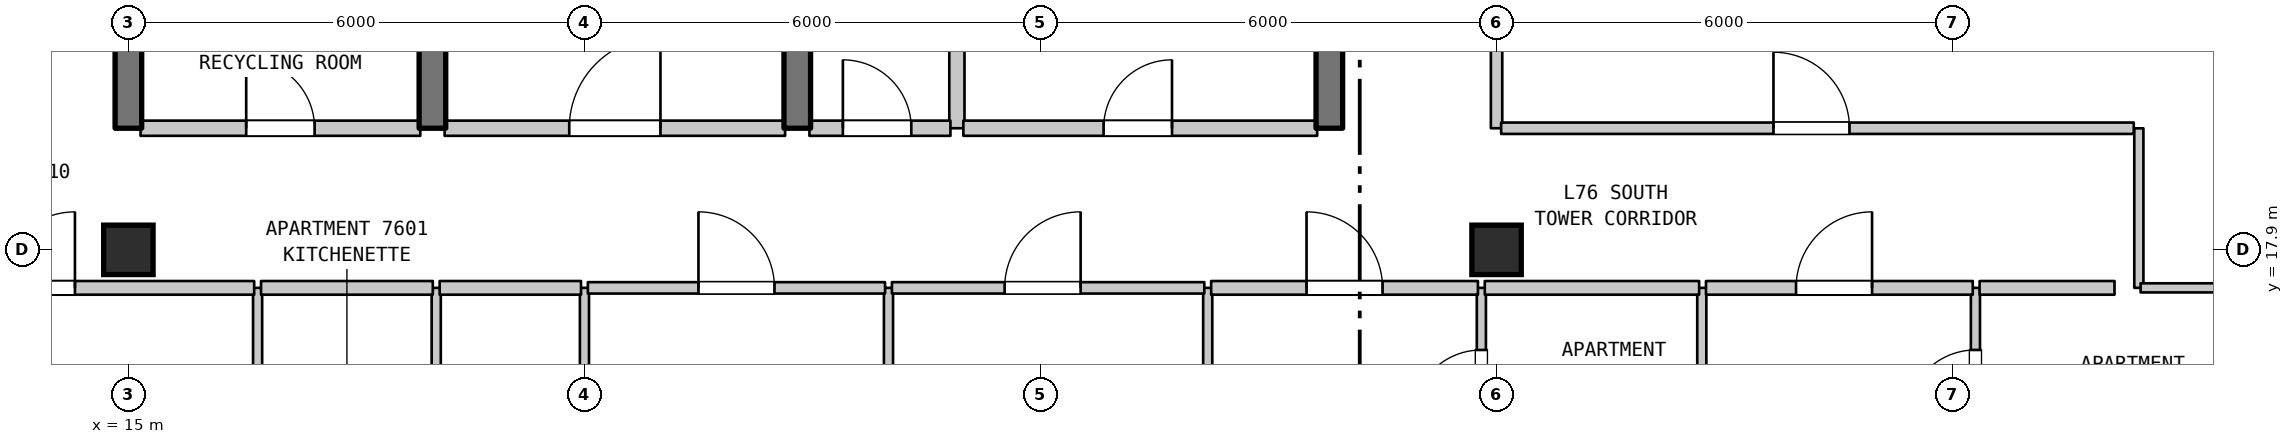
"""IFC4 building model, lengths in metres.
Left out: names, types, materials, properties, quantities, classifications, styles, units other than length and angle.
Written with IfcOpenShell. Run it as: python <this file> out.ifc"""

import sys

from ifc_helpers import new_model, si_unit, direction, frame, frame_2d, origin, origin_2d, place, context, subcontext, project, spatial, rectangle, extrude, element, fill, save


model = new_model("IFC4")
c1 = context("Model", 3, precision=1e-05, world=origin(), true_north=direction((0.0, 1.0)))
c2 = subcontext(c1, "Body", "Model", "MODEL_VIEW")
j1 = project(units=[si_unit("LENGTHUNIT", "METRE"), si_unit("PLANEANGLEUNIT", "RADIAN")], contexts=[c1])
p1 = place(None, origin())
s1 = spatial("IfcSite", under=j1, at=p1, CompositionType="ELEMENT")
p2 = place(p1, origin())
s2 = spatial("IfcBuilding", under=s1, at=p2, CompositionType="ELEMENT")
p3 = place(p2, frame((0.0, 0.0, 303.6)))
s3 = spatial("IfcBuildingStorey", under=s2, at=p3, CompositionType="ELEMENT", Elevation=303.6)
for number, where, z_axis, x_axis in (
    (1, (15.0, 17.9, 0.0), (0.0, 0.0, 1.0), (1.0, 0.0, 0.0)),
    (2, (33.0, 17.9, 0.0), (0.0, 0.0, 1.0), (1.0, 0.0, 0.0)),
):
    element("IfcColumn", number, at=place(p3, frame(where, z_axis=z_axis, x_axis=x_axis)), inside=s3, PredefinedType="COLUMN", context=c2, shape_type="SweptSolid", body=[
        extrude(rectangle(XDim=0.65, YDim=0.65, at=origin_2d()), origin(), (0.0, 0.0, 1.0), 3.7),
    ])
p4 = place(p3, frame((15.0, 19.5, 0.0), z_axis=(0.0, 0.0, 1.0), x_axis=(0.0, 1.0, 0.0)))
e3 = element("IfcWall", 3, at=p4, inside=s3, PredefinedType="SHEAR", context=c2, shape_type="SweptSolid", body=[
    extrude(rectangle(XDim=3.2, YDim=0.35, at=frame_2d((1.6, 0.0))), origin(), (0.0, 0.0, 1.0), 3.39),
])
p5 = place(p3, frame((16.7, 14.2, 0.0), z_axis=(0.0, 0.0, 1.0), x_axis=(0.0, 1.0, 0.0)))
e4 = element("IfcWall", 4, at=p5, inside=s3, PredefinedType="PARTITIONING", context=c2, shape_type="SweptSolid", body=[
    extrude(rectangle(XDim=3.2, YDim=0.12, at=frame_2d((1.6, 0.0))), origin(), (0.0, 0.0, 1.0), 3.39),
])
p6 = place(p5, frame((1.15, 0.0, 0.0)))
e5 = element("IfcOpeningElement", 5, at=p6, cuts=e4, PredefinedType="OPENING", context=c2, shape_type="SweptSolid", body=[
    extrude(rectangle(XDim=0.9, YDim=2.15, at=frame_2d((0.45, 1.075))), frame((0.0, 0.07, 0.0), z_axis=(0.0, -1.0, 0.0), x_axis=(1.0, 0.0, 0.0)), (0.0, 0.0, 1.0), 0.14),
])
p7 = place(p3, frame((19.0, 19.5, 0.0), z_axis=(0.0, 0.0, 1.0), x_axis=(0.0, 1.0, 0.0)))
e6 = element("IfcWall", 6, at=p7, inside=s3, PredefinedType="SHEAR", context=c2, shape_type="SweptSolid", body=[
    extrude(rectangle(XDim=3.2, YDim=0.35, at=frame_2d((1.6, 0.0))), origin(), (0.0, 0.0, 1.0), 3.39),
])
p8 = place(p3, frame((19.05, 14.2, 0.0), z_axis=(0.0, 0.0, 1.0), x_axis=(0.0, 1.0, 0.0)))
e7 = element("IfcWall", 7, at=p8, inside=s3, PredefinedType="PARTITIONING", context=c2, shape_type="SweptSolid", body=[
    extrude(rectangle(XDim=3.2, YDim=0.12, at=frame_2d((1.6, 0.0))), origin(), (0.0, 0.0, 1.0), 3.39),
])
p9 = place(p3, frame((21.0, 10.6, 0.0), z_axis=(0.0, 0.0, 1.0), x_axis=(0.0, 1.0, 0.0)))
e8 = element("IfcWall", 8, at=p9, inside=s3, PredefinedType="PARTITIONING", context=c2, shape_type="SweptSolid", body=[
    extrude(rectangle(XDim=6.8, YDim=0.12, at=frame_2d((3.4, 0.0))), origin(), (0.0, 0.0, 1.0), 3.39),
])
p10 = place(p3, frame((23.8, 19.5, 0.0), z_axis=(0.0, 0.0, 1.0), x_axis=(0.0, 1.0, 0.0)))
e9 = element("IfcWall", 9, at=p10, inside=s3, PredefinedType="SHEAR", context=c2, shape_type="SweptSolid", body=[
    extrude(rectangle(XDim=6.6, YDim=0.35, at=frame_2d((3.3, 0.0))), origin(), (0.0, 0.0, 1.0), 3.39),
])
p11 = place(p10, frame((4.304, 0.0, 0.0)))
e10 = element("IfcOpeningElement", 10, at=p11, cuts=e9, PredefinedType="OPENING", context=c2, shape_type="SweptSolid", body=[
    extrude(rectangle(XDim=0.9, YDim=2.15, at=frame_2d((0.45, 1.075))), frame((0.0, 0.185, 0.0), z_axis=(0.0, -1.0, 0.0), x_axis=(1.0, 0.0, 0.0)), (0.0, 0.0, 1.0), 0.37),
])
p12 = place(p3, frame((25.0, 10.6, 0.0), z_axis=(0.0, 0.0, 1.0), x_axis=(0.0, 1.0, 0.0)))
e11 = element("IfcWall", 11, at=p12, inside=s3, PredefinedType="PARTITIONING", context=c2, shape_type="SweptSolid", body=[
    extrude(rectangle(XDim=6.8, YDim=0.12, at=frame_2d((3.4, 0.0))), origin(), (0.0, 0.0, 1.0), 3.39),
])
p13 = place(p3, frame((25.9, 19.5, 0.0), z_axis=(0.0, 0.0, 1.0), x_axis=(0.0, 1.0, 0.0)))
e12 = element("IfcWall", 12, at=p13, inside=s3, PredefinedType="STANDARD", context=c2, shape_type="SweptSolid", body=[
    extrude(rectangle(XDim=3.2, YDim=0.2, at=frame_2d((1.6, 0.0))), origin(), (0.0, 0.0, 1.0), 3.39),
])
p14 = place(p3, frame((29.2, 6.71, 0.0), z_axis=(0.0, 0.0, 1.0), x_axis=(0.0, 1.0, 0.0)))
e13 = element("IfcWall", 13, at=p14, inside=s3, PredefinedType="PARTITIONING", context=c2, shape_type="SweptSolid", body=[
    extrude(rectangle(XDim=10.69, YDim=0.12, at=frame_2d((5.345, 0.0))), origin(), (0.0, 0.0, 1.0), 3.39),
])
p15 = place(p3, frame((30.8, 19.5, 0.0), z_axis=(0.0, 0.0, 1.0), x_axis=(0.0, 1.0, 0.0)))
e14 = element("IfcWall", 14, at=p15, inside=s3, PredefinedType="SHEAR", context=c2, shape_type="SweptSolid", body=[
    extrude(rectangle(XDim=3.2, YDim=0.35, at=frame_2d((1.6, 0.0))), origin(), (0.0, 0.0, 1.0), 3.39),
])
p16 = place(p3, frame((32.8, 15.008, 0.0), z_axis=(0.0, 0.0, 1.0), x_axis=(0.0, 1.0, 0.0)))
e15 = element("IfcWall", 15, at=p16, inside=s3, PredefinedType="PARTITIONING", context=c2, shape_type="SweptSolid", body=[
    extrude(rectangle(XDim=2.392, YDim=0.12, at=frame_2d((1.196, 0.0))), origin(), (0.0, 0.0, 1.0), 3.39),
])
p17 = place(p16, frame((0.675, 0.0, 0.0)))
e16 = element("IfcOpeningElement", 16, at=p17, cuts=e15, PredefinedType="OPENING", context=c2, shape_type="SweptSolid", body=[
    extrude(rectangle(XDim=0.9, YDim=2.1, at=frame_2d((0.45, 1.05))), frame((0.0, 0.07, 0.0), z_axis=(0.0, -1.0, 0.0), x_axis=(1.0, 0.0, 0.0)), (0.0, 0.0, 1.0), 0.14),
])
p18 = place(p3, frame((33.0, 19.5, 0.0), z_axis=(0.0, 0.0, 1.0), x_axis=(0.0, 1.0, 0.0)))
e17 = element("IfcWall", 17, at=p18, inside=s3, PredefinedType="STANDARD", context=c2, shape_type="SweptSolid", body=[
    extrude(rectangle(XDim=8.4, YDim=0.15, at=frame_2d((4.2, 0.0))), origin(), (0.0, 0.0, 1.0), 3.1),
])
p19 = place(p18, frame((4.079, 0.0, 0.0)))
e18 = element("IfcOpeningElement", 18, at=p19, cuts=e17, PredefinedType="OPENING", context=c2, shape_type="SweptSolid", body=[
    extrude(rectangle(XDim=1.0, YDim=2.15, at=frame_2d((0.5, 1.075))), frame((0.0, 0.085, 0.0), z_axis=(0.0, -1.0, 0.0), x_axis=(1.0, 0.0, 0.0)), (0.0, 0.0, 1.0), 0.17),
])
p20 = place(p3, frame((35.7, 15.008, 0.0), z_axis=(0.0, 0.0, 1.0), x_axis=(0.0, 1.0, 0.0)))
e19 = element("IfcWall", 19, at=p20, inside=s3, PredefinedType="PARTITIONING", context=c2, shape_type="SweptSolid", body=[
    extrude(rectangle(XDim=2.392, YDim=0.12, at=frame_2d((1.196, 0.0))), origin(), (0.0, 0.0, 1.0), 3.39),
])
p21 = place(p3, frame((39.3, 15.008, 0.0), z_axis=(0.0, 0.0, 1.0), x_axis=(0.0, 1.0, 0.0)))
e20 = element("IfcWall", 20, at=p21, inside=s3, PredefinedType="PARTITIONING", context=c2, shape_type="SweptSolid", body=[
    extrude(rectangle(XDim=2.392, YDim=0.12, at=frame_2d((1.196, 0.0))), origin(), (0.0, 0.0, 1.0), 3.39),
])
p22 = place(p21, frame((0.675, 0.0, 0.0)))
e21 = element("IfcOpeningElement", 21, at=p22, cuts=e20, PredefinedType="OPENING", context=c2, shape_type="SweptSolid", body=[
    extrude(rectangle(XDim=0.9, YDim=2.1, at=frame_2d((0.45, 1.05))), frame((0.0, 0.07, 0.0), z_axis=(0.0, -1.0, 0.0), x_axis=(1.0, 0.0, 0.0)), (0.0, 0.0, 1.0), 0.14),
])
p23 = place(p3, frame((41.45, 17.4, 0.0), z_axis=(0.0, 0.0, 1.0), x_axis=(0.0, 1.0, 0.0)))
e22 = element("IfcWall", 22, at=p23, inside=s3, PredefinedType="PARTITIONING", context=c2, shape_type="SweptSolid", body=[
    extrude(rectangle(XDim=2.099, YDim=0.12, at=frame_2d((1.05, 0.0))), origin(), (0.0, 0.0, 1.0), 3.39),
])
p24 = place(p3, frame((12.975, 17.4, 0.0), z_axis=(0.0, 0.0, 1.0), x_axis=(1.0, 0.0, 0.0)))
e23 = element("IfcWall", 23, at=p24, inside=s3, PredefinedType="STANDARD", context=c2, shape_type="SweptSolid", body=[
    extrude(rectangle(XDim=3.68, YDim=0.18, at=frame_2d((1.84, 0.0))), origin(), (0.0, 0.0, 1.0), 3.39),
])
p25 = place(p24, frame((0.322, 0.0, 0.0)))
e24 = element("IfcOpeningElement", 24, at=p25, cuts=e23, PredefinedType="OPENING", context=c2, shape_type="SweptSolid", body=[
    extrude(rectangle(XDim=1.0, YDim=2.15, at=frame_2d((0.5, 1.075))), frame((0.0, 0.1, 0.0), z_axis=(0.0, -1.0, 0.0), x_axis=(1.0, 0.0, 0.0)), (0.0, 0.0, 1.0), 0.2),
])
p26 = place(p3, frame((16.745, 17.4, 0.0), z_axis=(0.0, 0.0, 1.0), x_axis=(1.0, 0.0, 0.0)))
e25 = element("IfcWall", 25, at=p26, inside=s3, PredefinedType="STANDARD", context=c2, shape_type="SweptSolid", body=[
    extrude(rectangle(XDim=2.26, YDim=0.18, at=frame_2d((1.13, 0.0))), origin(), (0.0, 0.0, 1.0), 3.39),
])
p27 = place(p3, frame((19.095, 17.4, 0.0), z_axis=(0.0, 0.0, 1.0), x_axis=(1.0, 0.0, 0.0)))
e26 = element("IfcWall", 26, at=p27, inside=s3, PredefinedType="STANDARD", context=c2, shape_type="SweptSolid", body=[
    extrude(rectangle(XDim=1.86, YDim=0.18, at=frame_2d((0.93, 0.0))), origin(), (0.0, 0.0, 1.0), 3.39),
])
p28 = place(p3, frame((21.045, 17.4, 0.0), z_axis=(0.0, 0.0, 1.0), x_axis=(1.0, 0.0, 0.0)))
e27 = element("IfcWall", 27, at=p28, inside=s3, PredefinedType="STANDARD", context=c2, shape_type="SweptSolid", body=[
    extrude(rectangle(XDim=3.91, YDim=0.15, at=frame_2d((1.955, 0.0))), origin(), (0.0, 0.0, 1.0), 3.39),
])
p29 = place(p28, frame((1.455, 0.0, 0.0)))
e28 = element("IfcOpeningElement", 28, at=p29, cuts=e27, PredefinedType="OPENING", context=c2, shape_type="SweptSolid", body=[
    extrude(rectangle(XDim=1.0, YDim=2.15, at=frame_2d((0.5, 1.075))), frame((0.0, 0.085, 0.0), z_axis=(0.0, -1.0, 0.0), x_axis=(1.0, 0.0, 0.0)), (0.0, 0.0, 1.0), 0.17),
])
p30 = place(p3, frame((25.045, 17.4, 0.0), z_axis=(0.0, 0.0, 1.0), x_axis=(1.0, 0.0, 0.0)))
e29 = element("IfcWall", 29, at=p30, inside=s3, PredefinedType="STANDARD", context=c2, shape_type="SweptSolid", body=[
    extrude(rectangle(XDim=4.11, YDim=0.15, at=frame_2d((2.055, 0.0))), origin(), (0.0, 0.0, 1.0), 3.39),
])
p31 = place(p30, frame((1.483, 0.0, 0.0)))
e30 = element("IfcOpeningElement", 30, at=p31, cuts=e29, PredefinedType="OPENING", context=c2, shape_type="SweptSolid", body=[
    extrude(rectangle(XDim=1.0, YDim=2.15, at=frame_2d((0.5, 1.075))), frame((0.0, 0.085, 0.0), z_axis=(0.0, -1.0, 0.0), x_axis=(1.0, 0.0, 0.0)), (0.0, 0.0, 1.0), 0.17),
])
p32 = place(p3, frame((29.245, 17.4, 0.0), z_axis=(0.0, 0.0, 1.0), x_axis=(1.0, 0.0, 0.0)))
e31 = element("IfcWall", 31, at=p32, inside=s3, PredefinedType="STANDARD", context=c2, shape_type="SweptSolid", body=[
    extrude(rectangle(XDim=3.51, YDim=0.18, at=frame_2d((1.755, 0.0))), origin(), (0.0, 0.0, 1.0), 3.39),
])
p33 = place(p32, frame((1.255, 0.0, 0.0)))
e32 = element("IfcOpeningElement", 32, at=p33, cuts=e31, PredefinedType="OPENING", context=c2, shape_type="SweptSolid", body=[
    extrude(rectangle(XDim=1.0, YDim=2.15, at=frame_2d((0.5, 1.075))), frame((0.0, 0.1, 0.0), z_axis=(0.0, -1.0, 0.0), x_axis=(1.0, 0.0, 0.0)), (0.0, 0.0, 1.0), 0.2),
])
p34 = place(p3, frame((32.845, 17.4, 0.0), z_axis=(0.0, 0.0, 1.0), x_axis=(1.0, 0.0, 0.0)))
e33 = element("IfcWall", 33, at=p34, inside=s3, PredefinedType="STANDARD", context=c2, shape_type="SweptSolid", body=[
    extrude(rectangle(XDim=2.82, YDim=0.18, at=frame_2d((1.41, 0.0))), origin(), (0.0, 0.0, 1.0), 3.39),
])
p35 = place(p3, frame((35.755, 17.4, 0.0), z_axis=(0.0, 0.0, 1.0), x_axis=(1.0, 0.0, 0.0)))
e34 = element("IfcWall", 34, at=p35, inside=s3, PredefinedType="STANDARD", context=c2, shape_type="SweptSolid", body=[
    extrude(rectangle(XDim=3.51, YDim=0.18, at=frame_2d((1.755, 0.0))), origin(), (0.0, 0.0, 1.0), 3.39),
])
p36 = place(p35, frame((1.185, 0.0, 0.0)))
e35 = element("IfcOpeningElement", 35, at=p36, cuts=e34, PredefinedType="OPENING", context=c2, shape_type="SweptSolid", body=[
    extrude(rectangle(XDim=1.0, YDim=2.15, at=frame_2d((0.5, 1.075))), frame((0.0, 0.1, 0.0), z_axis=(0.0, -1.0, 0.0), x_axis=(1.0, 0.0, 0.0)), (0.0, 0.0, 1.0), 0.2),
])
p37 = place(p3, frame((39.355, 17.4, 0.0), z_axis=(0.0, 0.0, 1.0), x_axis=(1.0, 0.0, 0.0)))
e36 = element("IfcWall", 36, at=p37, inside=s3, PredefinedType="STANDARD", context=c2, shape_type="SweptSolid", body=[
    extrude(rectangle(XDim=1.775, YDim=0.18, at=frame_2d((0.887, 0.0))), origin(), (0.0, 0.0, 1.0), 3.39),
])
p38 = place(p3, frame((41.473, 17.4, 0.0), z_axis=(0.0, 0.0, 1.0), x_axis=(1.0, 0.0, 0.0)))
e37 = element("IfcWall", 37, at=p38, inside=s3, PredefinedType="PARTITIONING", context=c2, shape_type="SweptSolid", body=[
    extrude(rectangle(XDim=2.031, YDim=0.12, at=frame_2d((1.016, 0.0))), origin(), (0.0, 0.0, 1.0), 3.39),
])
p39 = place(p3, frame((15.16, 19.5, 0.0), z_axis=(0.0, 0.0, 1.0), x_axis=(1.0, 0.0, 0.0)))
e38 = element("IfcWall", 38, at=p39, inside=s3, PredefinedType="STANDARD", context=c2, shape_type="SweptSolid", body=[
    extrude(rectangle(XDim=3.68, YDim=0.2, at=frame_2d((1.84, 0.0))), origin(), (0.0, 0.0, 1.0), 3.39),
])
p40 = place(p39, frame((1.39, 0.0, 0.0)))
e39 = element("IfcOpeningElement", 39, at=p40, cuts=e38, PredefinedType="OPENING", context=c2, shape_type="SweptSolid", body=[
    extrude(rectangle(XDim=0.9, YDim=2.15, at=frame_2d((0.45, 1.075))), frame((0.0, 0.11, 0.0), z_axis=(0.0, -1.0, 0.0), x_axis=(1.0, 0.0, 0.0)), (0.0, 0.0, 1.0), 0.22),
])
p41 = place(p3, frame((19.16, 19.5, 0.0), z_axis=(0.0, 0.0, 1.0), x_axis=(1.0, 0.0, 0.0)))
e40 = element("IfcWall", 40, at=p41, inside=s3, PredefinedType="STANDARD", context=c2, shape_type="SweptSolid", body=[
    extrude(rectangle(XDim=4.48, YDim=0.2, at=frame_2d((2.24, 0.0))), origin(), (0.0, 0.0, 1.0), 3.39),
])
p42 = place(p41, frame((1.64, 0.0, 0.0)))
e41 = element("IfcOpeningElement", 41, at=p42, cuts=e40, PredefinedType="OPENING", context=c2, shape_type="SweptSolid", body=[
    extrude(rectangle(XDim=1.2, YDim=2.2, at=frame_2d((0.6, 1.1))), frame((0.0, 0.11, 0.0), z_axis=(0.0, -1.0, 0.0), x_axis=(1.0, 0.0, 0.0)), (0.0, 0.0, 1.0), 0.22),
])
p43 = place(p3, frame((23.96, 19.5, 0.0), z_axis=(0.0, 0.0, 1.0), x_axis=(1.0, 0.0, 0.0)))
e42 = element("IfcWall", 42, at=p43, inside=s3, PredefinedType="STANDARD", context=c2, shape_type="SweptSolid", body=[
    extrude(rectangle(XDim=1.855, YDim=0.2, at=frame_2d((0.927, 0.0))), origin(), (0.0, 0.0, 1.0), 3.39),
])
p44 = place(p43, frame((0.44, 0.0, 0.0)))
e43 = element("IfcOpeningElement", 43, at=p44, cuts=e42, PredefinedType="OPENING", context=c2, shape_type="SweptSolid", body=[
    extrude(rectangle(XDim=0.9, YDim=2.15, at=frame_2d((0.45, 1.075))), frame((0.0, 0.11, 0.0), z_axis=(0.0, -1.0, 0.0), x_axis=(1.0, 0.0, 0.0)), (0.0, 0.0, 1.0), 0.22),
])
p45 = place(p3, frame((25.985, 19.5, 0.0), z_axis=(0.0, 0.0, 1.0), x_axis=(1.0, 0.0, 0.0)))
e44 = element("IfcWall", 44, at=p45, inside=s3, PredefinedType="STANDARD", context=c2, shape_type="SweptSolid", body=[
    extrude(rectangle(XDim=4.655, YDim=0.2, at=frame_2d((2.327, 0.0))), origin(), (0.0, 0.0, 1.0), 3.39),
])
p46 = place(p45, frame((1.845, 0.0, 0.0)))
e45 = element("IfcOpeningElement", 45, at=p46, cuts=e44, PredefinedType="OPENING", context=c2, shape_type="SweptSolid", body=[
    extrude(rectangle(XDim=0.9, YDim=2.15, at=frame_2d((0.45, 1.075))), frame((0.0, 0.11, 0.0), z_axis=(0.0, -1.0, 0.0), x_axis=(1.0, 0.0, 0.0)), (0.0, 0.0, 1.0), 0.22),
])
p47 = place(p3, frame((33.06, 19.5, 0.0), z_axis=(0.0, 0.0, 1.0), x_axis=(1.0, 0.0, 0.0)))
e46 = element("IfcWall", 46, at=p47, inside=s3, PredefinedType="STANDARD", context=c2, shape_type="SweptSolid", body=[
    extrude(rectangle(XDim=8.323, YDim=0.15, at=frame_2d((4.162, 0.0))), origin(), (0.0, 0.0, 1.0), 3.39),
])
p48 = place(p47, frame((3.583, 0.0, 0.0)))
e47 = element("IfcOpeningElement", 47, at=p48, cuts=e46, PredefinedType="OPENING", context=c2, shape_type="SweptSolid", body=[
    extrude(rectangle(XDim=1.0, YDim=2.15, at=frame_2d((0.5, 1.075))), frame((0.0, 0.085, 0.0), z_axis=(0.0, -1.0, 0.0), x_axis=(1.0, 0.0, 0.0)), (0.0, 0.0, 1.0), 0.17),
])
p49 = place(p17, origin())
e48 = element("IfcDoor", 48, at=p49, inside=s3, OperationType="SINGLE_SWING_LEFT", PredefinedType="DOOR", context=c2, shape_type="SweptSolid", body=[
    extrude(rectangle(XDim=0.9, YDim=2.1, at=frame_2d((0.45, 1.05))), frame((0.0, 0.025, 0.0), z_axis=(0.0, -1.0, 0.0), x_axis=(1.0, 0.0, 0.0)), (0.0, 0.0, 1.0), 0.05),
])
fill(e16, e48)
p50 = place(p22, origin())
e49 = element("IfcDoor", 49, at=p50, inside=s3, OperationType="SINGLE_SWING_LEFT", PredefinedType="DOOR", context=c2, shape_type="SweptSolid", body=[
    extrude(rectangle(XDim=0.9, YDim=2.1, at=frame_2d((0.45, 1.05))), frame((0.0, 0.025, 0.0), z_axis=(0.0, -1.0, 0.0), x_axis=(1.0, 0.0, 0.0)), (0.0, 0.0, 1.0), 0.05),
])
fill(e21, e49)
p51 = place(p25, origin())
e50 = element("IfcDoor", 50, at=p51, inside=s3, OperationType="SINGLE_SWING_RIGHT", PredefinedType="DOOR", context=c2, shape_type="SweptSolid", body=[
    extrude(rectangle(XDim=1.0, YDim=2.15, at=frame_2d((0.5, 1.075))), frame((0.0, 0.025, 0.0), z_axis=(0.0, -1.0, 0.0), x_axis=(1.0, 0.0, 0.0)), (0.0, 0.0, 1.0), 0.05),
])
fill(e24, e50)
p52 = place(p29, origin())
e51 = element("IfcDoor", 51, at=p52, inside=s3, OperationType="SINGLE_SWING_LEFT", PredefinedType="DOOR", context=c2, shape_type="SweptSolid", body=[
    extrude(rectangle(XDim=1.0, YDim=2.15, at=frame_2d((0.5, 1.075))), frame((0.0, 0.025, 0.0), z_axis=(0.0, -1.0, 0.0), x_axis=(1.0, 0.0, 0.0)), (0.0, 0.0, 1.0), 0.05),
])
fill(e28, e51)
p53 = place(p31, origin())
e52 = element("IfcDoor", 52, at=p53, inside=s3, OperationType="SINGLE_SWING_RIGHT", PredefinedType="DOOR", context=c2, shape_type="SweptSolid", body=[
    extrude(rectangle(XDim=1.0, YDim=2.15, at=frame_2d((0.5, 1.075))), frame((0.0, 0.025, 0.0), z_axis=(0.0, -1.0, 0.0), x_axis=(1.0, 0.0, 0.0)), (0.0, 0.0, 1.0), 0.05),
])
fill(e30, e52)
p54 = place(p33, origin())
e53 = element("IfcDoor", 53, at=p54, inside=s3, OperationType="SINGLE_SWING_LEFT", PredefinedType="DOOR", context=c2, shape_type="SweptSolid", body=[
    extrude(rectangle(XDim=1.0, YDim=2.15, at=frame_2d((0.5, 1.075))), frame((0.0, 0.025, 0.0), z_axis=(0.0, -1.0, 0.0), x_axis=(1.0, 0.0, 0.0)), (0.0, 0.0, 1.0), 0.05),
])
fill(e32, e53)
p55 = place(p36, origin())
e54 = element("IfcDoor", 54, at=p55, inside=s3, OperationType="SINGLE_SWING_RIGHT", PredefinedType="DOOR", context=c2, shape_type="SweptSolid", body=[
    extrude(rectangle(XDim=1.0, YDim=2.15, at=frame_2d((0.5, 1.075))), frame((0.0, 0.025, 0.0), z_axis=(0.0, -1.0, 0.0), x_axis=(1.0, 0.0, 0.0)), (0.0, 0.0, 1.0), 0.05),
])
fill(e35, e54)
p56 = place(p40, origin())
e55 = element("IfcDoor", 55, at=p56, inside=s3, OperationType="SINGLE_SWING_LEFT", PredefinedType="DOOR", context=c2, shape_type="SweptSolid", body=[
    extrude(rectangle(XDim=0.9, YDim=2.15, at=frame_2d((0.45, 1.075))), frame((0.0, 0.025, 0.0), z_axis=(0.0, -1.0, 0.0), x_axis=(1.0, 0.0, 0.0)), (0.0, 0.0, 1.0), 0.05),
])
fill(e39, e55)
p57 = place(p42, origin())
e56 = element("IfcDoor", 56, at=p57, inside=s3, OperationType="SINGLE_SWING_RIGHT", PredefinedType="DOOR", context=c2, shape_type="SweptSolid", body=[
    extrude(rectangle(XDim=1.2, YDim=2.2, at=frame_2d((0.6, 1.1))), frame((0.0, 0.025, 0.0), z_axis=(0.0, -1.0, 0.0), x_axis=(1.0, 0.0, 0.0)), (0.0, 0.0, 1.0), 0.05),
])
fill(e41, e56)
p58 = place(p44, origin())
e57 = element("IfcDoor", 57, at=p58, inside=s3, OperationType="SINGLE_SWING_LEFT", PredefinedType="DOOR", context=c2, shape_type="SweptSolid", body=[
    extrude(rectangle(XDim=0.9, YDim=2.15, at=frame_2d((0.45, 1.075))), frame((0.0, 0.025, 0.0), z_axis=(0.0, -1.0, 0.0), x_axis=(1.0, 0.0, 0.0)), (0.0, 0.0, 1.0), 0.05),
])
fill(e43, e57)
p59 = place(p46, origin())
e58 = element("IfcDoor", 58, at=p59, inside=s3, OperationType="SINGLE_SWING_RIGHT", PredefinedType="DOOR", context=c2, shape_type="SweptSolid", body=[
    extrude(rectangle(XDim=0.9, YDim=2.15, at=frame_2d((0.45, 1.075))), frame((0.0, 0.025, 0.0), z_axis=(0.0, -1.0, 0.0), x_axis=(1.0, 0.0, 0.0)), (0.0, 0.0, 1.0), 0.05),
])
fill(e45, e58)
p60 = place(p48, origin())
e59 = element("IfcDoor", 59, at=p60, inside=s3, OperationType="SINGLE_SWING_LEFT", PredefinedType="DOOR", context=c2, shape_type="SweptSolid", body=[
    extrude(rectangle(XDim=1.0, YDim=2.15, at=frame_2d((0.5, 1.075))), frame((0.0, 0.025, 0.0), z_axis=(0.0, -1.0, 0.0), x_axis=(1.0, 0.0, 0.0)), (0.0, 0.0, 1.0), 0.05),
])
fill(e47, e59)
save(model, sys.argv[1])
